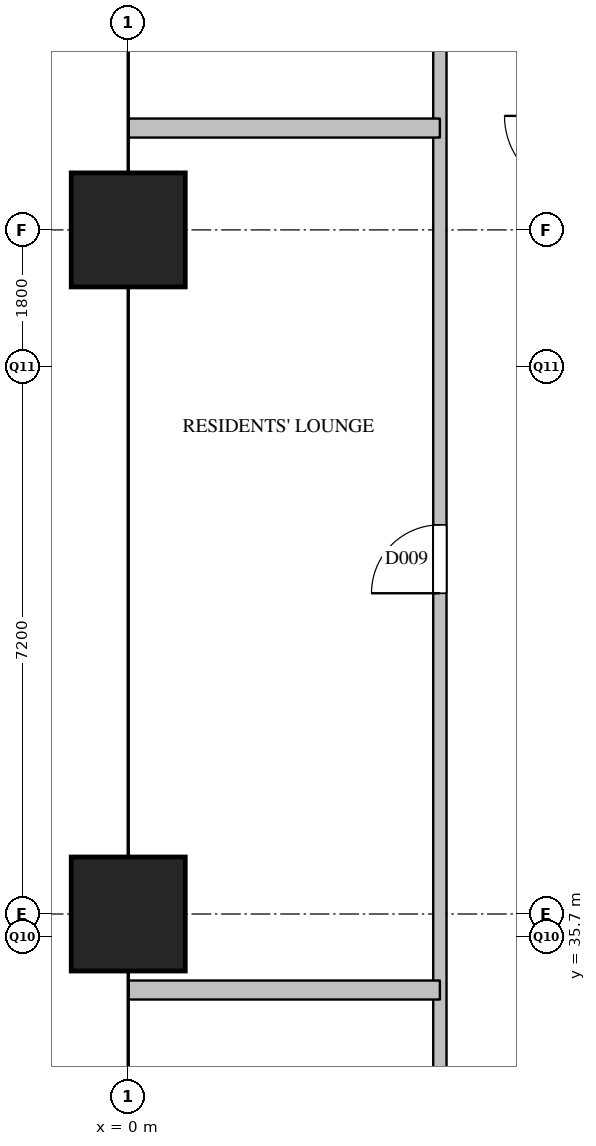
"""IFC4 building model, lengths in metres.
Left out: names, types, materials, properties, quantities, classifications, styles, units other than length and angle.
Written with IfcOpenShell. Run it as: python <this file> out.ifc"""

import sys

from ifc_helpers import new_model, si_unit, direction, frame, frame_2d, origin, origin_2d, place, context, subcontext, project, spatial, rectangle, extrude, element, fill, save


model = new_model("IFC4")
c1 = context("Model", 3, precision=1e-05, world=origin(), true_north=direction((0.0, 1.0)))
c2 = subcontext(c1, "Body", "Model", "MODEL_VIEW")
j1 = project(units=[si_unit("LENGTHUNIT", "METRE"), si_unit("PLANEANGLEUNIT", "RADIAN")], contexts=[c1])
p1 = place(None, origin())
s1 = spatial("IfcSite", under=j1, at=p1, CompositionType="ELEMENT")
p2 = place(p1, origin())
s2 = spatial("IfcBuilding", under=s1, at=p2, CompositionType="ELEMENT")
p3 = place(p2, frame((0.0, 0.0, 177.8)))
s3 = spatial("IfcBuildingStorey", under=s2, at=p3, CompositionType="ELEMENT", Elevation=177.8)
for number, where, z_axis, x_axis in (
    (1, (0.0, 36.0, 0.0), (0.0, 0.0, 1.0), (1.0, 0.0, 0.0)),
    (2, (0.0, 45.0, 0.0), (0.0, 0.0, 1.0), (1.0, 0.0, 0.0)),
):
    element("IfcColumn", number, at=place(p3, frame(where, z_axis=z_axis, x_axis=x_axis)), inside=s3, PredefinedType="COLUMN", context=c2, shape_type="SweptSolid", body=[
        extrude(rectangle(XDim=1.5, YDim=1.5, at=origin_2d()), origin(), (0.0, 0.0, 1.0), 3.9),
    ])
p4 = place(p3, frame((4.1, 28.5, 0.0), z_axis=(0.0, 0.0, 1.0), x_axis=(0.0, 1.0, 0.0)))
e3 = element("IfcWall", 3, at=p4, inside=s3, PredefinedType="PARTITIONING", context=c2, shape_type="SweptSolid", body=[
    extrude(rectangle(XDim=23.0, YDim=0.175, at=frame_2d((11.5, 0.0))), origin(), (0.0, 0.0, 1.0), 3.6),
])
p5 = place(p4, frame((2.8, 0.0, 0.0)))
e4 = element("IfcOpeningElement", 4, at=p5, cuts=e3, PredefinedType="OPENING", context=c2, shape_type="SweptSolid", body=[
    extrude(rectangle(XDim=0.9, YDim=2.1, at=frame_2d((0.45, 1.05))), frame((0.0, 0.097, 0.0), z_axis=(0.0, -1.0, 0.0), x_axis=(1.0, 0.0, 0.0)), (0.0, 0.0, 1.0), 0.195),
])
p6 = place(p4, frame((11.72, 0.0, 0.0)))
e5 = element("IfcOpeningElement", 5, at=p6, cuts=e3, PredefinedType="OPENING", context=c2, shape_type="SweptSolid", body=[
    extrude(rectangle(XDim=0.9, YDim=2.1, at=frame_2d((0.45, 1.05))), frame((0.0, 0.097, 0.0), z_axis=(0.0, -1.0, 0.0), x_axis=(1.0, 0.0, 0.0)), (0.0, 0.0, 1.0), 0.195),
])
p7 = place(p4, frame((19.97, 0.0, 0.0)))
e6 = element("IfcOpeningElement", 6, at=p7, cuts=e3, PredefinedType="OPENING", context=c2, shape_type="SweptSolid", body=[
    extrude(rectangle(XDim=0.9, YDim=2.1, at=frame_2d((0.45, 1.05))), frame((0.0, 0.097, 0.0), z_axis=(0.0, -1.0, 0.0), x_axis=(1.0, 0.0, 0.0)), (0.0, 0.0, 1.0), 0.195),
])
for number, where, z_axis, x_axis in (
    (7, (0.0, 35.0, 0.0), (0.0, 0.0, 1.0), (1.0, 0.0, 0.0)),
    (8, (0.0, 46.34, 0.0), (0.0, 0.0, 1.0), (1.0, 0.0, 0.0)),
):
    element("IfcWall", number, at=place(p3, frame(where, z_axis=z_axis, x_axis=x_axis)), inside=s3, PredefinedType="PARTITIONING", context=c2, shape_type="SweptSolid", body=[
        extrude(rectangle(XDim=4.1, YDim=0.25, at=frame_2d((2.05, 0.0))), origin(), (0.0, 0.0, 1.0), 2.6),
    ])
p8 = place(p6, origin())
e9 = element("IfcDoor", 9, at=p8, inside=s3, OperationType="SINGLE_SWING_LEFT", PredefinedType="DOOR", context=c2, shape_type="SweptSolid", body=[
    extrude(rectangle(XDim=0.9, YDim=2.1, at=frame_2d((0.45, 1.05))), frame((0.0, 0.025, 0.0), z_axis=(0.0, -1.0, 0.0), x_axis=(1.0, 0.0, 0.0)), (0.0, 0.0, 1.0), 0.05),
])
fill(e5, e9)
save(model, sys.argv[1])
